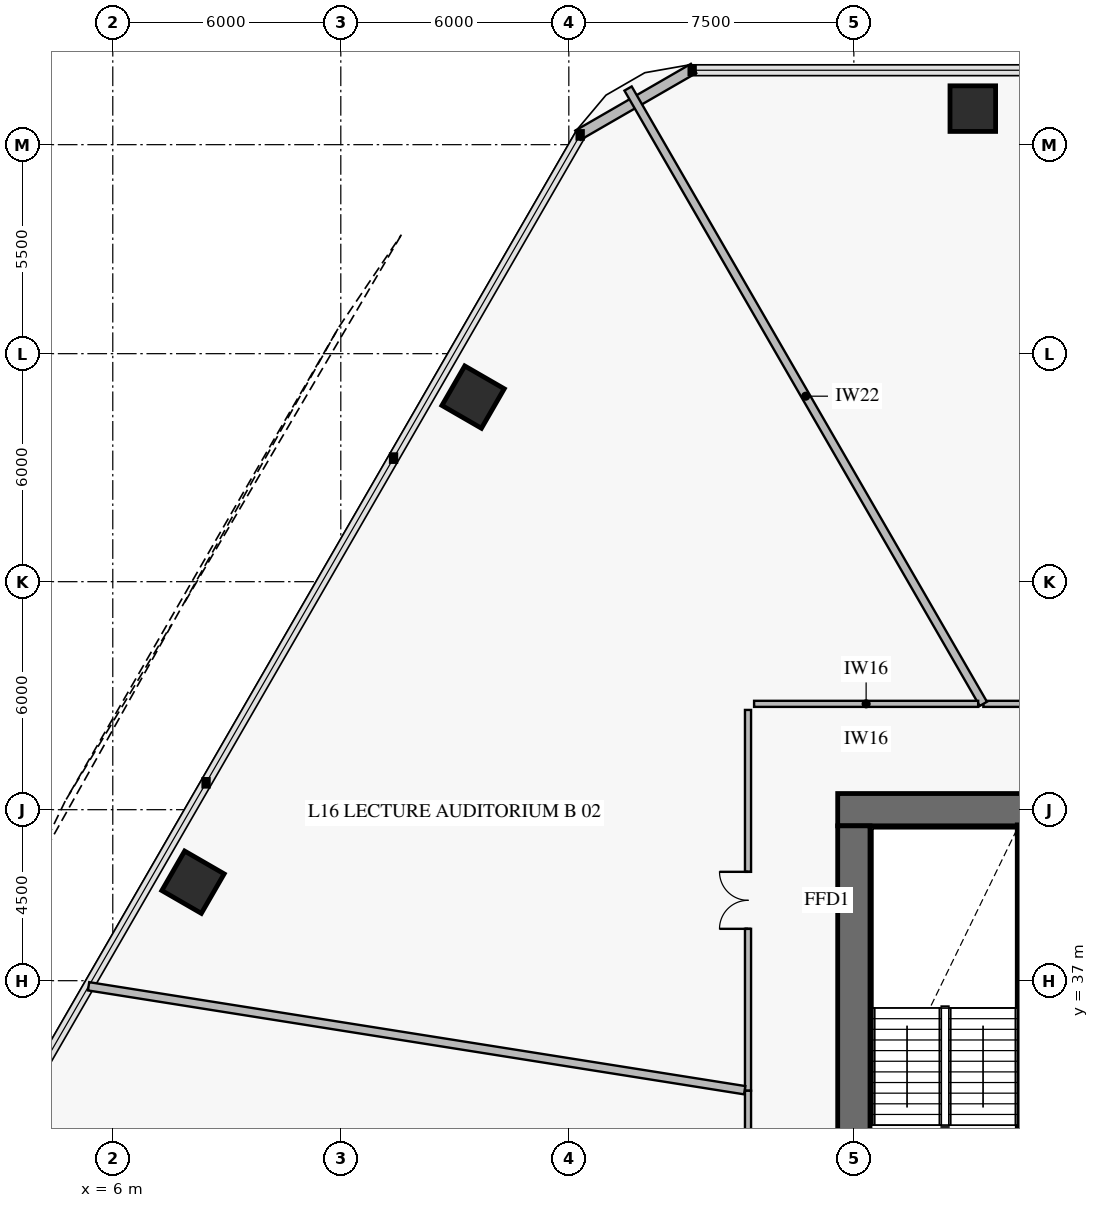
"""IFC4 building model, lengths in metres.
Left out: names, types, materials, properties, quantities, classifications, styles, units other than length and angle.
Written with IfcOpenShell. Run it as: python <this file> out.ifc"""

import sys

from ifc_helpers import new_model, si_unit, direction, frame, frame_2d, origin, origin_2d, place, context, subcontext, project, spatial, rectangle, extrude, element, fill, save


model = new_model("IFC4")
c1 = context("Model", 3, precision=1e-05, world=origin(), true_north=direction((0.0, 1.0)))
c2 = subcontext(c1, "Body", "Model", "MODEL_VIEW")
j1 = project(units=[si_unit("LENGTHUNIT", "METRE"), si_unit("PLANEANGLEUNIT", "RADIAN")], contexts=[c1])
p1 = place(None, origin())
s1 = spatial("IfcSite", under=j1, at=p1, CompositionType="ELEMENT")
p2 = place(p1, origin())
s2 = spatial("IfcBuilding", under=s1, at=p2, CompositionType="ELEMENT")
p3 = place(p2, frame((0.0, 0.0, 66.6)))
s3 = spatial("IfcBuildingStorey", under=s2, at=p3, CompositionType="ELEMENT", Elevation=66.6)
p4 = place(p3, frame((36.75, 41.5, 0.0), z_axis=(0.0, 0.0, 1.0), x_axis=(-1.0, 0.0, 0.0)))
e1 = element("IfcWall", 1, at=p4, inside=s3, PredefinedType="SHEAR", context=c2, shape_type="SweptSolid", body=[
    extrude(rectangle(XDim=11.675, YDim=0.85, at=frame_2d((5.837, 0.0))), origin(), (0.0, 0.0, 1.0), 4.2),
])
p5 = place(p4, frame((4.25, 0.0, 0.0)))
e2 = element("IfcOpeningElement", 2, at=p5, cuts=e1, PredefinedType="OPENING", context=c2, shape_type="SweptSolid", body=[
    extrude(rectangle(XDim=1.1, YDim=2.15, at=frame_2d((0.55, 1.075))), frame((0.0, 0.437, 0.0), z_axis=(0.0, -1.0, 0.0), x_axis=(1.0, 0.0, 0.0)), (0.0, 0.0, 1.0), 0.874),
])
p6 = place(p3, frame((25.5, 22.925, 0.0), z_axis=(0.0, 0.0, 1.0), x_axis=(0.0, 1.0, 0.0)))
e3 = element("IfcWall", 3, at=p6, inside=s3, PredefinedType="SHEAR", context=c2, shape_type="SweptSolid", body=[
    extrude(rectangle(XDim=18.15, YDim=0.85, at=frame_2d((9.075, 0.0))), origin(), (0.0, 0.0, 1.0), 4.2),
])
p7 = place(p6, frame((8.825, 0.0, 0.0)))
e4 = element("IfcOpeningElement", 4, at=p7, cuts=e3, PredefinedType="OPENING", context=c2, shape_type="SweptSolid", body=[
    extrude(rectangle(XDim=1.1, YDim=2.15, at=frame_2d((0.55, 1.075))), frame((0.0, 0.437, 0.0), z_axis=(0.0, -1.0, 0.0), x_axis=(1.0, 0.0, 0.0)), (0.0, 0.0, 1.0), 0.874),
])
for number, where, z_axis, x_axis in (
    (5, (28.63, 59.948, 0.0), (0.0, 0.0, 1.0), (-1.0, 0.0, 0.0)),
    (6, (15.481, 52.357, 0.0), (0.0, 0.0, 1.0), (-0.5, -0.866, 0.0)),
    (7, (8.111, 39.592, 0.0), (0.0, 0.0, 1.0), (-0.5, -0.866, 0.0)),
):
    element("IfcColumn", number, at=place(p3, frame(where, z_axis=z_axis, x_axis=x_axis)), inside=s3, PredefinedType="COLUMN", context=c2, shape_type="SweptSolid", body=[
        extrude(rectangle(XDim=1.2, YDim=1.2, at=origin_2d()), origin(), (0.0, 0.0, 1.0), 3.92),
    ])
p8 = place(p3, frame((18.239, 59.249, 0.0), z_axis=(0.0, 0.0, 1.0), x_axis=(0.866007452331, 0.500031091541, 0.0)))
e8 = element("IfcWall", 8, at=p8, inside=s3, PredefinedType="SOLIDWALL", context=c2, shape_type="SweptSolid", body=[
    extrude(rectangle(XDim=3.515, YDim=0.28, at=frame_2d((1.757, 0.0))), origin(), (0.0, 0.0, 1.0), 3.92),
])
p9 = place(p3, frame((29.925, 31.4, 0.0), z_axis=(0.0, 0.0, 1.0), x_axis=(0.0, 1.0, 0.0)))
e9 = element("IfcWall", 9, at=p9, inside=s3, PredefinedType="SOLIDWALL", context=c2, shape_type="SweptSolid", body=[
    extrude(rectangle(XDim=9.7, YDim=0.25, at=frame_2d((4.85, 0.0))), origin(), (0.0, 0.0, 1.0), 4.2),
])
p10 = place(p3, frame((40.716, 44.285, 0.0), z_axis=(0.0, 0.0, 1.0), x_axis=(-1.0, 0.0, 0.0)))
e10 = element("IfcWall", 10, at=p10, inside=s3, PredefinedType="PARTITIONING", context=c2, shape_type="SweptSolid", body=[
    extrude(rectangle(XDim=11.809, YDim=0.16, at=frame_2d((5.904, 0.0))), origin(), (0.0, 0.0, 1.0), 3.22),
])
p11 = place(p10, frame((5.154, 0.0, 0.0)))
e11 = element("IfcOpeningElement", 11, at=p11, cuts=e10, PredefinedType="OPENING", context=c2, shape_type="SweptSolid", body=[
    extrude(rectangle(XDim=1.5, YDim=2.15, at=frame_2d((0.75, 1.075))), frame((0.0, 0.092, 0.0), z_axis=(0.0, -1.0, 0.0), x_axis=(1.0, 0.0, 0.0)), (0.0, 0.0, 1.0), 0.184),
])
p12 = place(p3, frame((22.715, 44.125, 0.0), z_axis=(0.0, 0.0, 1.0), x_axis=(0.0, -1.0, 0.0)))
e12 = element("IfcWall", 12, at=p12, inside=s3, PredefinedType="PARTITIONING", context=c2, shape_type="SweptSolid", body=[
    extrude(rectangle(XDim=10.021, YDim=0.16, at=frame_2d((5.01, 0.0))), origin(), (0.0, 0.0, 1.0), 3.22),
])
p13 = place(p12, frame((4.26, 0.0, 0.0)))
e13 = element("IfcOpeningElement", 13, at=p13, cuts=e12, PredefinedType="OPENING", context=c2, shape_type="SweptSolid", body=[
    extrude(rectangle(XDim=1.5, YDim=2.15, at=frame_2d((0.75, 1.075))), frame((0.0, 0.092, 0.0), z_axis=(0.0, -1.0, 0.0), x_axis=(1.0, 0.0, 0.0)), (0.0, 0.0, 1.0), 0.184),
])
p14 = place(p3, frame((22.715, 34.104, 0.0), z_axis=(0.0, 0.0, 1.0), x_axis=(0.0, -1.0, 0.0)))
e14 = element("IfcWall", 14, at=p14, inside=s3, PredefinedType="PARTITIONING", context=c2, shape_type="SweptSolid", body=[
    extrude(rectangle(XDim=14.229, YDim=0.16, at=frame_2d((7.115, 0.0))), origin(), (0.0, 0.0, 1.0), 3.22),
])
p15 = place(p14, frame((6.54, 0.0, 0.0)))
e15 = element("IfcOpeningElement", 15, at=p15, cuts=e14, PredefinedType="OPENING", context=c2, shape_type="SweptSolid", body=[
    extrude(rectangle(XDim=1.15, YDim=2.2, at=frame_2d((0.575, 1.1))), frame((0.0, 0.092, 0.0), z_axis=(0.0, -1.0, 0.0), x_axis=(1.0, 0.0, 0.0)), (0.0, 0.0, 1.0), 0.184),
])
p16 = place(p3, frame((28.907, 44.285, 0.0), z_axis=(0.0, 0.0, 1.0), x_axis=(-0.499994105362, 0.866028807028, 0.0)))
e16 = element("IfcWall", 16, at=p16, inside=s3, PredefinedType="PARTITIONING", context=c2, shape_type="SweptSolid", body=[
    extrude(rectangle(XDim=18.697, YDim=0.22, at=frame_2d((9.349, 0.0))), origin(), (0.0, 0.0, 1.0), 3.17),
])
p17 = place(p3, frame((28.771, 44.285, 0.0), z_axis=(0.0, 0.0, 1.0), x_axis=(-1.0, 0.0, 0.0)))
e17 = element("IfcWall", 17, at=p17, inside=s3, PredefinedType="PARTITIONING", context=c2, shape_type="SweptSolid", body=[
    extrude(rectangle(XDim=5.896, YDim=0.16, at=frame_2d((2.948, 0.0))), origin(), (0.0, 0.0, 1.0), 3.22),
])
p18 = place(p3, frame((22.627, 34.118, 0.0), z_axis=(0.0, 0.0, 1.0), x_axis=(-0.987689809262, 0.156425191961, 0.0)))
e18 = element("IfcWall", 18, at=p18, inside=s3, PredefinedType="PARTITIONING", context=c2, shape_type="SweptSolid", body=[
    extrude(rectangle(XDim=17.479, YDim=0.22, at=frame_2d((8.739, 0.0))), origin(), (0.0, 0.0, 1.0), 3.17),
])
p19 = place(p13, frame((1.5, 0.0, 0.0), z_axis=(0.0, 0.0, 1.0), x_axis=(-1.0, 0.0, 0.0)))
e19 = element("IfcDoor", 19, at=p19, inside=s3, OperationType="DOUBLE_DOOR_SINGLE_SWING", PredefinedType="DOOR", context=c2, shape_type="SweptSolid", body=[
    extrude(rectangle(XDim=1.5, YDim=2.15, at=frame_2d((0.75, 1.075))), frame((0.0, 0.025, 0.0), z_axis=(0.0, -1.0, 0.0), x_axis=(1.0, 0.0, 0.0)), (0.0, 0.0, 1.0), 0.05),
])
fill(e13, e19)
save(model, sys.argv[1])
